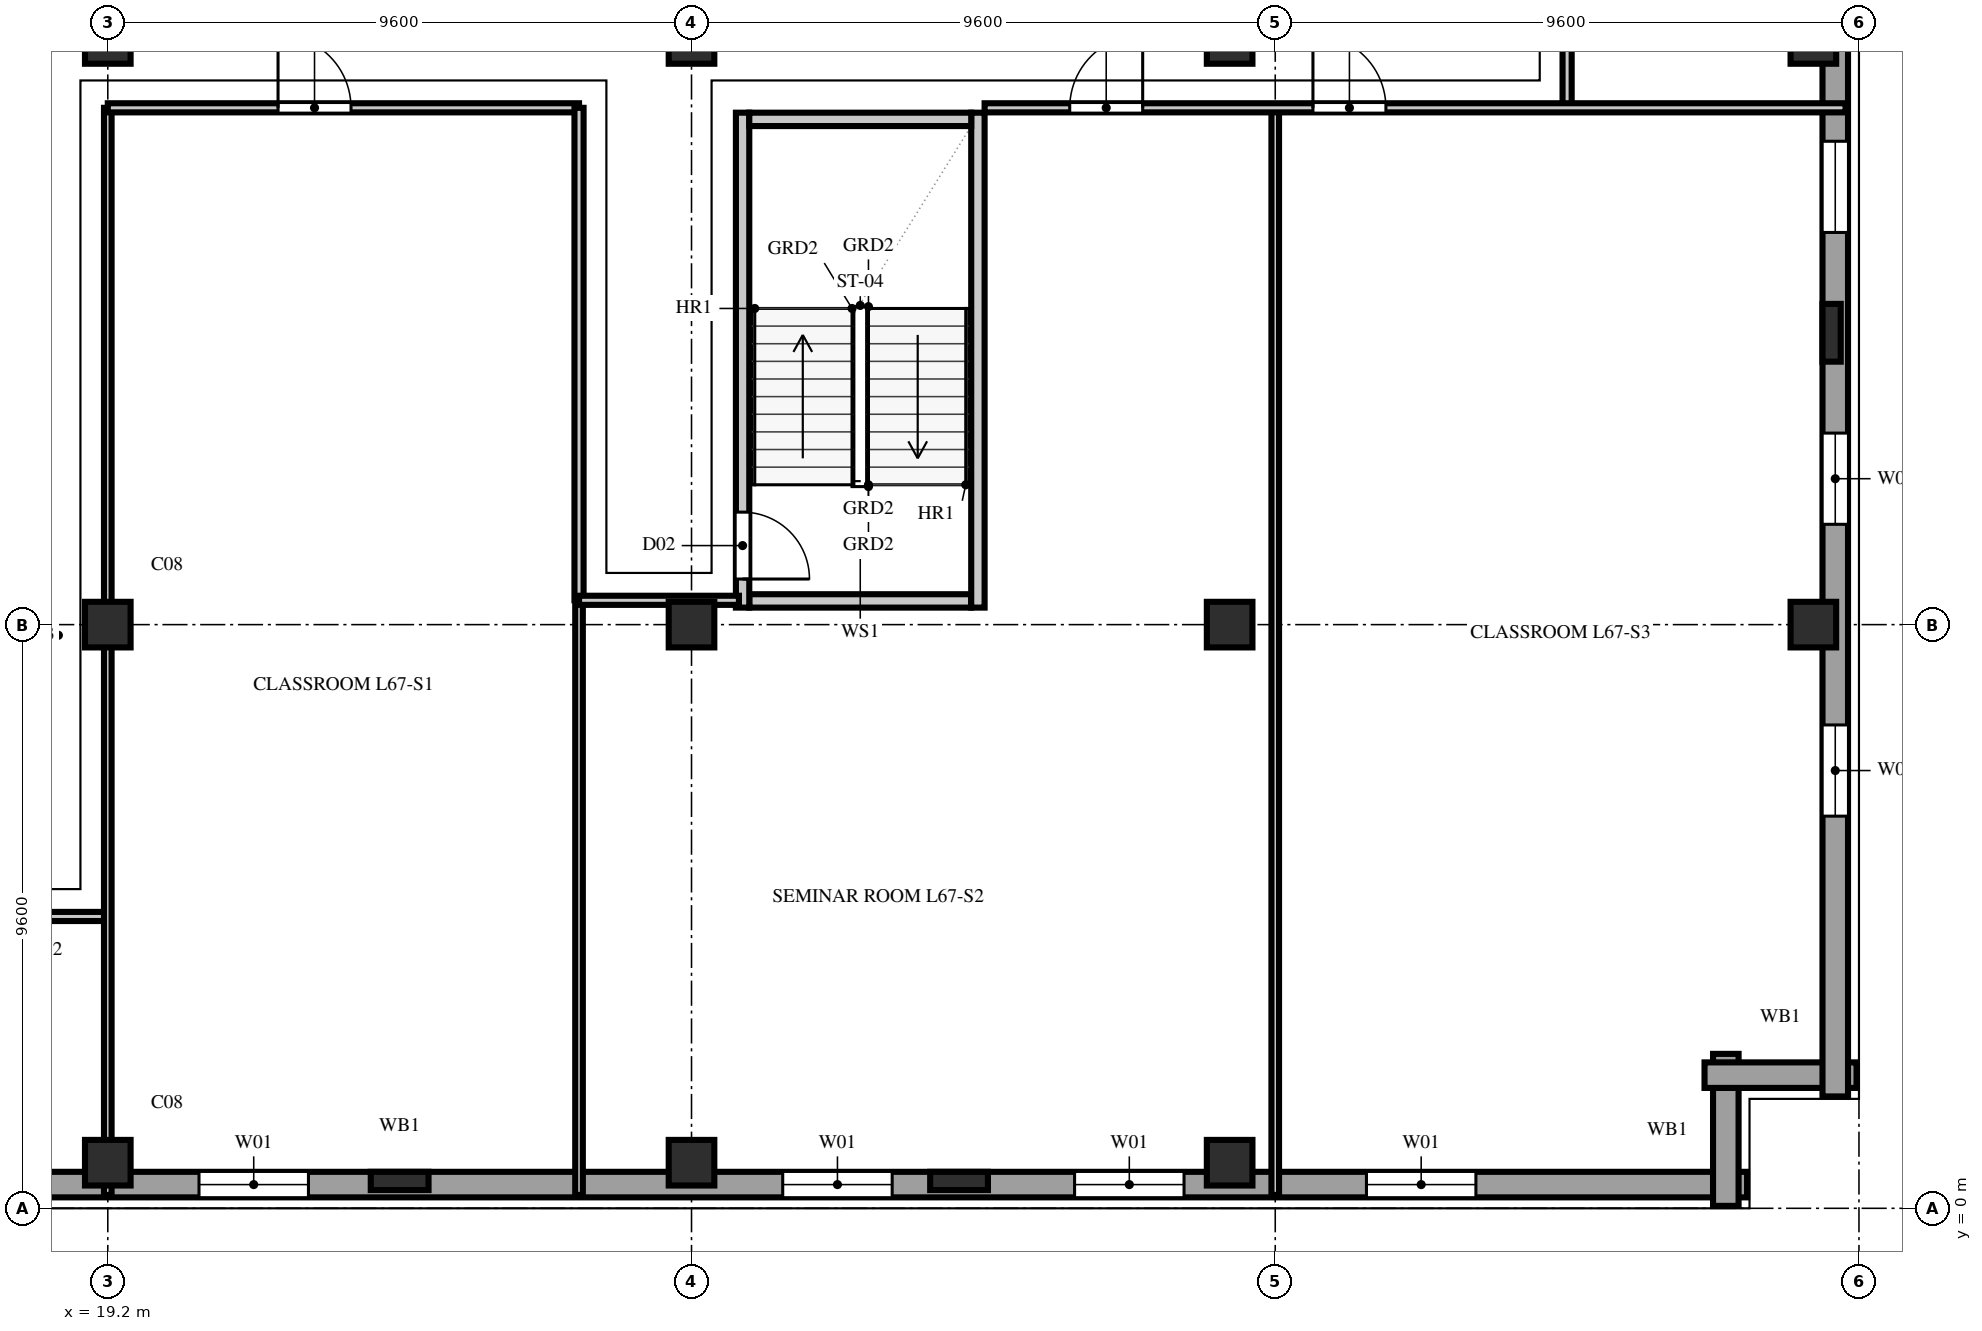
"""IFC4 building model, lengths in metres.
Left out: names, types, materials, properties, quantities, classifications, styles, units other than length and angle.
Written with IfcOpenShell. Run it as: python <this file> out.ifc"""

import sys

from ifc_helpers import new_model, si_unit, direction, frame, frame_2d, origin, origin_2d, place, context, subcontext, project, spatial, rectangle, extrude, element, fill, save


model = new_model("IFC4")
c1 = context("Model", 3, precision=1e-05, world=origin(), true_north=direction((0.0, 1.0)))
c2 = subcontext(c1, "Body", "Model", "MODEL_VIEW")
j1 = project(units=[si_unit("LENGTHUNIT", "METRE"), si_unit("PLANEANGLEUNIT", "RADIAN")], contexts=[c1])
p1 = place(None, origin())
s1 = spatial("IfcSite", under=j1, at=p1, CompositionType="ELEMENT")
p2 = place(p1, origin())
s2 = spatial("IfcBuilding", under=s1, at=p2, CompositionType="ELEMENT")
p3 = place(p2, frame((0.0, 0.0, 265.8)))
s3 = spatial("IfcBuildingStorey", under=s2, at=p3, CompositionType="ELEMENT", Elevation=265.8)
for number, where, z_axis, x_axis in (
    (1, (19.2, 0.75, 0.0), (0.0, 0.0, 1.0), (1.0, 0.0, 0.0)),
    (2, (19.2, 9.6, 0.0), (0.0, 0.0, 1.0), (1.0, 0.0, 0.0)),
    (3, (19.2, 19.2, 0.0), (0.0, 0.0, 1.0), (1.0, 0.0, 0.0)),
    (4, (28.8, 0.75, 0.0), (0.0, 0.0, 1.0), (1.0, 0.0, 0.0)),
    (5, (28.8, 9.6, 0.0), (0.0, 0.0, 1.0), (1.0, 0.0, 0.0)),
    (6, (28.8, 19.2, 0.0), (0.0, 0.0, 1.0), (1.0, 0.0, 0.0)),
    (7, (37.65, 0.75, 0.0), (0.0, 0.0, 1.0), (1.0, 0.0, 0.0)),
    (8, (37.65, 9.6, 0.0), (0.0, 0.0, 1.0), (1.0, 0.0, 0.0)),
    (9, (37.65, 19.2, 0.0), (0.0, 0.0, 1.0), (1.0, 0.0, 0.0)),
    (10, (47.25, 9.6, 0.0), (0.0, 0.0, 1.0), (1.0, 0.0, 0.0)),
    (11, (47.25, 19.2, 0.0), (0.0, 0.0, 1.0), (1.0, 0.0, 0.0)),
):
    element("IfcColumn", number, at=place(p3, frame(where, z_axis=z_axis, x_axis=x_axis)), inside=s3, PredefinedType="COLUMN", context=c2, shape_type="SweptSolid", body=[
        extrude(rectangle(XDim=0.75, YDim=0.75, at=origin_2d()), origin(), (0.0, 0.0, 1.0), 3.8),
    ])
for number, where, z_axis, x_axis in (
    (12, (24.0, 0.45, 0.0), (0.0, 0.0, 1.0), (1.0, 0.0, 0.0)),
    (13, (33.2, 0.45, 0.0), (0.0, 0.0, 1.0), (1.0, 0.0, 0.0)),
    (14, (47.55, 14.4, 0.0), (0.0, 0.0, 1.0), (0.0, 1.0, 0.0)),
):
    element("IfcColumn", number, at=place(p3, frame(where, z_axis=z_axis, x_axis=x_axis)), inside=s3, PredefinedType="PILASTER", context=c2, shape_type="SweptSolid", body=[
        extrude(rectangle(XDim=0.95, YDim=0.3, at=origin_2d()), origin(), (0.0, 0.0, 1.0), 3.8),
    ])
p4 = place(p3, frame((1.84, 0.39, 0.0), z_axis=(0.0, 0.0, 1.0), x_axis=(1.0, 0.0, 0.0)))
e15 = element("IfcWall", 15, at=p4, inside=s3, PredefinedType="SOLIDWALL", context=c2, shape_type="SweptSolid", body=[
    extrude(rectangle(XDim=44.32, YDim=0.42, at=frame_2d((22.16, 0.0))), origin(), (0.0, 0.0, 1.0), 3.54),
])
p5 = place(p4, frame((4.46, 0.0, 0.85)))
e16 = element("IfcOpeningElement", 16, at=p5, cuts=e15, PredefinedType="OPENING", context=c2, shape_type="SweptSolid", body=[
    extrude(rectangle(XDim=1.8, YDim=1.85, at=frame_2d((0.9, 0.925))), frame((0.0, 0.222, 0.0), z_axis=(0.0, -1.0, 0.0), x_axis=(1.0, 0.0, 0.0)), (0.0, 0.0, 1.0), 0.444),
])
p6 = place(p4, frame((9.26, 0.0, 0.85)))
e17 = element("IfcOpeningElement", 17, at=p6, cuts=e15, PredefinedType="OPENING", context=c2, shape_type="SweptSolid", body=[
    extrude(rectangle(XDim=1.8, YDim=1.85, at=frame_2d((0.9, 0.925))), frame((0.0, 0.222, 0.0), z_axis=(0.0, -1.0, 0.0), x_axis=(1.0, 0.0, 0.0)), (0.0, 0.0, 1.0), 0.444),
])
p7 = place(p4, frame((18.86, 0.0, 0.85)))
e18 = element("IfcOpeningElement", 18, at=p7, cuts=e15, PredefinedType="OPENING", context=c2, shape_type="SweptSolid", body=[
    extrude(rectangle(XDim=1.8, YDim=1.85, at=frame_2d((0.9, 0.925))), frame((0.0, 0.222, 0.0), z_axis=(0.0, -1.0, 0.0), x_axis=(1.0, 0.0, 0.0)), (0.0, 0.0, 1.0), 0.444),
])
p8 = place(p4, frame((28.46, 0.0, 0.85)))
e19 = element("IfcOpeningElement", 19, at=p8, cuts=e15, PredefinedType="OPENING", context=c2, shape_type="SweptSolid", body=[
    extrude(rectangle(XDim=1.8, YDim=1.85, at=frame_2d((0.9, 0.925))), frame((0.0, 0.222, 0.0), z_axis=(0.0, -1.0, 0.0), x_axis=(1.0, 0.0, 0.0)), (0.0, 0.0, 1.0), 0.444),
])
p9 = place(p4, frame((33.26, 0.0, 0.85)))
e20 = element("IfcOpeningElement", 20, at=p9, cuts=e15, PredefinedType="OPENING", context=c2, shape_type="SweptSolid", body=[
    extrude(rectangle(XDim=1.8, YDim=1.85, at=frame_2d((0.9, 0.925))), frame((0.0, 0.222, 0.0), z_axis=(0.0, -1.0, 0.0), x_axis=(1.0, 0.0, 0.0)), (0.0, 0.0, 1.0), 0.444),
])
p10 = place(p4, frame((38.06, 0.0, 0.85)))
e21 = element("IfcOpeningElement", 21, at=p10, cuts=e15, PredefinedType="OPENING", context=c2, shape_type="SweptSolid", body=[
    extrude(rectangle(XDim=1.8, YDim=1.85, at=frame_2d((0.9, 0.925))), frame((0.0, 0.222, 0.0), z_axis=(0.0, -1.0, 0.0), x_axis=(1.0, 0.0, 0.0)), (0.0, 0.0, 1.0), 0.444),
])
for number, where, z_axis, x_axis in (
    (22, (45.81, 0.04, 0.0), (0.0, 0.0, 1.0), (0.0, 1.0, 0.0)),
    (23, (45.46, 2.19, 0.0), (0.0, 0.0, 1.0), (1.0, 0.0, 0.0)),
):
    element("IfcWall", number, at=place(p3, frame(where, z_axis=z_axis, x_axis=x_axis)), inside=s3, PredefinedType="SOLIDWALL", context=c2, shape_type="SweptSolid", body=[
        extrude(rectangle(XDim=2.5, YDim=0.42, at=frame_2d((1.25, 0.0))), origin(), (0.0, 0.0, 1.0), 3.54),
    ])
p11 = place(p3, frame((47.61, 1.84, 0.0), z_axis=(0.0, 0.0, 1.0), x_axis=(0.0, 1.0, 0.0)))
e24 = element("IfcWall", 24, at=p11, inside=s3, PredefinedType="SOLIDWALL", context=c2, shape_type="SweptSolid", body=[
    extrude(rectangle(XDim=34.72, YDim=0.42, at=frame_2d((17.36, 0.0))), origin(), (0.0, 0.0, 1.0), 3.54),
])
p12 = place(p11, frame((4.61, 0.0, 0.85)))
e25 = element("IfcOpeningElement", 25, at=p12, cuts=e24, PredefinedType="OPENING", context=c2, shape_type="SweptSolid", body=[
    extrude(rectangle(XDim=1.5, YDim=1.85, at=frame_2d((0.75, 0.925))), frame((0.0, 0.222, 0.0), z_axis=(0.0, -1.0, 0.0), x_axis=(1.0, 0.0, 0.0)), (0.0, 0.0, 1.0), 0.444),
])
p13 = place(p11, frame((9.41, 0.0, 0.85)))
e26 = element("IfcOpeningElement", 26, at=p13, cuts=e24, PredefinedType="OPENING", context=c2, shape_type="SweptSolid", body=[
    extrude(rectangle(XDim=1.5, YDim=1.85, at=frame_2d((0.75, 0.925))), frame((0.0, 0.222, 0.0), z_axis=(0.0, -1.0, 0.0), x_axis=(1.0, 0.0, 0.0)), (0.0, 0.0, 1.0), 0.444),
])
p14 = place(p11, frame((14.21, 0.0, 0.85)))
e27 = element("IfcOpeningElement", 27, at=p14, cuts=e24, PredefinedType="OPENING", context=c2, shape_type="SweptSolid", body=[
    extrude(rectangle(XDim=1.5, YDim=1.85, at=frame_2d((0.75, 0.925))), frame((0.0, 0.222, 0.0), z_axis=(0.0, -1.0, 0.0), x_axis=(1.0, 0.0, 0.0)), (0.0, 0.0, 1.0), 0.444),
])
p15 = place(p11, frame((23.81, 0.0, 0.85)))
e28 = element("IfcOpeningElement", 28, at=p15, cuts=e24, PredefinedType="OPENING", context=c2, shape_type="SweptSolid", body=[
    extrude(rectangle(XDim=1.5, YDim=1.85, at=frame_2d((0.75, 0.925))), frame((0.0, 0.222, 0.0), z_axis=(0.0, -1.0, 0.0), x_axis=(1.0, 0.0, 0.0)), (0.0, 0.0, 1.0), 0.444),
])
p16 = place(p11, frame((28.61, 0.0, 0.85)))
e29 = element("IfcOpeningElement", 29, at=p16, cuts=e24, PredefinedType="OPENING", context=c2, shape_type="SweptSolid", body=[
    extrude(rectangle(XDim=1.5, YDim=1.85, at=frame_2d((0.75, 0.925))), frame((0.0, 0.222, 0.0), z_axis=(0.0, -1.0, 0.0), x_axis=(1.0, 0.0, 0.0)), (0.0, 0.0, 1.0), 0.444),
])
p17 = place(p3, frame((29.75, 9.99, 0.0), z_axis=(0.0, 0.0, 1.0), x_axis=(1.0, 0.0, 0.0)))
e30 = element("IfcWall", 30, at=p17, inside=s3, PredefinedType="SOLIDWALL", context=c2, shape_type="SweptSolid", body=[
    extrude(rectangle(XDim=3.65, YDim=0.22, at=frame_2d((1.825, 0.0))), origin(), (0.0, 0.0, 1.0), 3.54),
])
p18 = place(p3, frame((29.64, 9.88, 0.0), z_axis=(0.0, 0.0, 1.0), x_axis=(0.0, 1.0, 0.0)))
e31 = element("IfcWall", 31, at=p18, inside=s3, PredefinedType="SOLIDWALL", context=c2, shape_type="SweptSolid", body=[
    extrude(rectangle(XDim=8.14, YDim=0.22, at=frame_2d((4.07, 0.0))), origin(), (0.0, 0.0, 1.0), 3.54),
])
p19 = place(p18, frame((0.47, 0.0, 0.0)))
e32 = element("IfcOpeningElement", 32, at=p19, cuts=e31, PredefinedType="OPENING", context=c2, shape_type="SweptSolid", body=[
    extrude(rectangle(XDim=1.1, YDim=2.2, at=frame_2d((0.55, 1.1))), frame((0.0, 0.122, 0.0), z_axis=(0.0, -1.0, 0.0), x_axis=(1.0, 0.0, 0.0)), (0.0, 0.0, 1.0), 0.244),
])
p20 = place(p3, frame((33.51, 9.88, 0.0), z_axis=(0.0, 0.0, 1.0), x_axis=(0.0, 1.0, 0.0)))
e33 = element("IfcWall", 33, at=p20, inside=s3, PredefinedType="SOLIDWALL", context=c2, shape_type="SweptSolid", body=[
    extrude(rectangle(XDim=8.14, YDim=0.22, at=frame_2d((4.07, 0.0))), origin(), (0.0, 0.0, 1.0), 3.54),
])
p21 = place(p3, frame((29.75, 17.91, 0.0), z_axis=(0.0, 0.0, 1.0), x_axis=(1.0, 0.0, 0.0)))
e34 = element("IfcWall", 34, at=p21, inside=s3, PredefinedType="SOLIDWALL", context=c2, shape_type="SweptSolid", body=[
    extrude(rectangle(XDim=3.65, YDim=0.22, at=frame_2d((1.825, 0.0))), origin(), (0.0, 0.0, 1.0), 3.54),
])
p22 = place(p3, frame((17.05, 4.8, 0.0), z_axis=(0.0, 0.0, 1.0), x_axis=(1.0, 0.0, 0.0)))
e35 = element("IfcWall", 35, at=p22, inside=s3, PredefinedType="PARTITIONING", context=c2, shape_type="SweptSolid", body=[
    extrude(rectangle(XDim=2.15, YDim=0.15, at=frame_2d((1.075, 0.0))), origin(), (0.0, 0.0, 1.0), 3.54),
])
p23 = place(p3, frame((43.2, 18.1, 0.0), z_axis=(0.0, 0.0, 1.0), x_axis=(0.0, 1.0, 0.0)))
e36 = element("IfcWall", 36, at=p23, inside=s3, PredefinedType="PARTITIONING", context=c2, shape_type="SweptSolid", body=[
    extrude(rectangle(XDim=2.85, YDim=0.15, at=frame_2d((1.425, 0.0))), origin(), (0.0, 0.0, 1.0), 3.54),
])
p24 = place(p3, frame((19.2, 0.22, 0.0), z_axis=(0.0, 0.0, 1.0), x_axis=(0.0, 1.0, 0.0)))
e37 = element("IfcWall", 37, at=p24, inside=s3, PredefinedType="PARTITIONING", context=c2, shape_type="SweptSolid", body=[
    extrude(rectangle(XDim=0.53, YDim=0.125, at=frame_2d((0.265, 0.0))), origin(), (0.0, 0.0, 1.0), 3.54),
])
p25 = place(p3, frame((19.2, 0.75, 0.0), z_axis=(0.0, 0.0, 1.0), x_axis=(0.0, 1.0, 0.0)))
e38 = element("IfcWall", 38, at=p25, inside=s3, PredefinedType="PARTITIONING", context=c2, shape_type="SweptSolid", body=[
    extrude(rectangle(XDim=17.35, YDim=0.125, at=frame_2d((8.675, 0.0))), origin(), (0.0, 0.0, 1.0), 3.123),
])
p26 = place(p3, frame((19.2, 18.1, 0.0), z_axis=(0.0, 0.0, 1.0), x_axis=(1.0, 0.0, 0.0)))
e39 = element("IfcWall", 39, at=p26, inside=s3, PredefinedType="PARTITIONING", context=c2, shape_type="SweptSolid", body=[
    extrude(rectangle(XDim=7.75, YDim=0.15, at=frame_2d((3.875, 0.0))), origin(), (0.0, 0.0, 1.0), 3.54),
])
p27 = place(p26, frame((2.8, 0.0, 0.0)))
e40 = element("IfcOpeningElement", 40, at=p27, cuts=e39, PredefinedType="OPENING", context=c2, shape_type="SweptSolid", body=[
    extrude(rectangle(XDim=1.2, YDim=2.2, at=frame_2d((0.6, 1.1))), frame((0.0, 0.087, 0.0), z_axis=(0.0, -1.0, 0.0), x_axis=(1.0, 0.0, 0.0)), (0.0, 0.0, 1.0), 0.174),
])
p28 = place(p3, frame((26.95, 0.22, 0.0), z_axis=(0.0, 0.0, 1.0), x_axis=(0.0, 1.0, 0.0)))
e41 = element("IfcWall", 41, at=p28, inside=s3, PredefinedType="PARTITIONING", context=c2, shape_type="SweptSolid", body=[
    extrude(rectangle(XDim=9.78, YDim=0.125, at=frame_2d((4.89, 0.0))), origin(), (0.0, 0.0, 1.0), 3.54),
])
p29 = place(p3, frame((26.95, 10.0, 0.0), z_axis=(0.0, 0.0, 1.0), x_axis=(0.0, 1.0, 0.0)))
e42 = element("IfcWall", 42, at=p29, inside=s3, PredefinedType="PARTITIONING", context=c2, shape_type="SweptSolid", body=[
    extrude(rectangle(XDim=8.1, YDim=0.15, at=frame_2d((4.05, 0.0))), origin(), (0.0, 0.0, 1.0), 3.54),
])
p30 = place(p3, frame((26.95, 10.0, 0.0), z_axis=(0.0, 0.0, 1.0), x_axis=(1.0, 0.0, 0.0)))
e43 = element("IfcWall", 43, at=p30, inside=s3, PredefinedType="PARTITIONING", context=c2, shape_type="SweptSolid", body=[
    extrude(rectangle(XDim=2.63, YDim=0.15, at=frame_2d((1.315, 0.0))), origin(), (0.0, 0.0, 1.0), 3.54),
])
p31 = place(p3, frame((38.4, 0.22, 0.0), z_axis=(0.0, 0.0, 1.0), x_axis=(0.0, 1.0, 0.0)))
e44 = element("IfcWall", 44, at=p31, inside=s3, PredefinedType="PARTITIONING", context=c2, shape_type="SweptSolid", body=[
    extrude(rectangle(XDim=17.88, YDim=0.125, at=frame_2d((8.94, 0.0))), origin(), (0.0, 0.0, 1.0), 3.54),
])
p32 = place(p3, frame((33.62, 18.1, 0.0), z_axis=(0.0, 0.0, 1.0), x_axis=(1.0, 0.0, 0.0)))
e45 = element("IfcWall", 45, at=p32, inside=s3, PredefinedType="PARTITIONING", context=c2, shape_type="SweptSolid", body=[
    extrude(rectangle(XDim=14.16, YDim=0.15, at=frame_2d((7.08, 0.0))), origin(), (0.0, 0.0, 1.0), 3.54),
])
p33 = place(p32, frame((1.4, 0.0, 0.0)))
e46 = element("IfcOpeningElement", 46, at=p33, cuts=e45, PredefinedType="OPENING", context=c2, shape_type="SweptSolid", body=[
    extrude(rectangle(XDim=1.2, YDim=2.2, at=frame_2d((0.6, 1.1))), frame((0.0, 0.087, 0.0), z_axis=(0.0, -1.0, 0.0), x_axis=(1.0, 0.0, 0.0)), (0.0, 0.0, 1.0), 0.174),
])
p34 = place(p32, frame((5.4, 0.0, 0.0)))
e47 = element("IfcOpeningElement", 47, at=p34, cuts=e45, PredefinedType="OPENING", context=c2, shape_type="SweptSolid", body=[
    extrude(rectangle(XDim=1.2, YDim=2.2, at=frame_2d((0.6, 1.1))), frame((0.0, 0.087, 0.0), z_axis=(0.0, -1.0, 0.0), x_axis=(1.0, 0.0, 0.0)), (0.0, 0.0, 1.0), 0.174),
])
p35 = place(p7, origin())
e48 = element("IfcWindow", 48, at=p35, inside=s3, PartitioningType="DOUBLE_PANEL_VERTICAL", PredefinedType="WINDOW", context=c2, shape_type="SweptSolid", body=[
    extrude(rectangle(XDim=1.8, YDim=1.85, at=frame_2d((0.9, 0.925))), frame((0.0, 0.11, 0.0), z_axis=(0.0, -1.0, 0.0), x_axis=(1.0, 0.0, 0.0)), (0.0, 0.0, 1.0), 0.06),
])
fill(e18, e48)
p36 = place(p8, origin())
e49 = element("IfcWindow", 49, at=p36, inside=s3, PartitioningType="DOUBLE_PANEL_VERTICAL", PredefinedType="WINDOW", context=c2, shape_type="SweptSolid", body=[
    extrude(rectangle(XDim=1.8, YDim=1.85, at=frame_2d((0.9, 0.925))), frame((0.0, 0.11, 0.0), z_axis=(0.0, -1.0, 0.0), x_axis=(1.0, 0.0, 0.0)), (0.0, 0.0, 1.0), 0.06),
])
fill(e19, e49)
p37 = place(p9, origin())
e50 = element("IfcWindow", 50, at=p37, inside=s3, PartitioningType="DOUBLE_PANEL_VERTICAL", PredefinedType="WINDOW", context=c2, shape_type="SweptSolid", body=[
    extrude(rectangle(XDim=1.8, YDim=1.85, at=frame_2d((0.9, 0.925))), frame((0.0, 0.11, 0.0), z_axis=(0.0, -1.0, 0.0), x_axis=(1.0, 0.0, 0.0)), (0.0, 0.0, 1.0), 0.06),
])
fill(e20, e50)
p38 = place(p10, origin())
e51 = element("IfcWindow", 51, at=p38, inside=s3, PartitioningType="DOUBLE_PANEL_VERTICAL", PredefinedType="WINDOW", context=c2, shape_type="SweptSolid", body=[
    extrude(rectangle(XDim=1.8, YDim=1.85, at=frame_2d((0.9, 0.925))), frame((0.0, 0.11, 0.0), z_axis=(0.0, -1.0, 0.0), x_axis=(1.0, 0.0, 0.0)), (0.0, 0.0, 1.0), 0.06),
])
fill(e21, e51)
p39 = place(p12, origin())
e52 = element("IfcWindow", 52, at=p39, inside=s3, PartitioningType="DOUBLE_PANEL_VERTICAL", PredefinedType="WINDOW", context=c2, shape_type="SweptSolid", body=[
    extrude(rectangle(XDim=1.5, YDim=1.85, at=frame_2d((0.75, 0.925))), frame((0.0, 0.11, 0.0), z_axis=(0.0, -1.0, 0.0), x_axis=(1.0, 0.0, 0.0)), (0.0, 0.0, 1.0), 0.06),
])
fill(e25, e52)
p40 = place(p13, origin())
e53 = element("IfcWindow", 53, at=p40, inside=s3, PartitioningType="DOUBLE_PANEL_VERTICAL", PredefinedType="WINDOW", context=c2, shape_type="SweptSolid", body=[
    extrude(rectangle(XDim=1.5, YDim=1.85, at=frame_2d((0.75, 0.925))), frame((0.0, 0.11, 0.0), z_axis=(0.0, -1.0, 0.0), x_axis=(1.0, 0.0, 0.0)), (0.0, 0.0, 1.0), 0.06),
])
fill(e26, e53)
p41 = place(p14, origin())
e54 = element("IfcWindow", 54, at=p41, inside=s3, PartitioningType="DOUBLE_PANEL_VERTICAL", PredefinedType="WINDOW", context=c2, shape_type="SweptSolid", body=[
    extrude(rectangle(XDim=1.5, YDim=1.85, at=frame_2d((0.75, 0.925))), frame((0.0, 0.11, 0.0), z_axis=(0.0, -1.0, 0.0), x_axis=(1.0, 0.0, 0.0)), (0.0, 0.0, 1.0), 0.06),
])
fill(e27, e54)
p42 = place(p19, frame((1.1, 0.0, 0.0), z_axis=(0.0, 0.0, 1.0), x_axis=(-1.0, 0.0, 0.0)))
e55 = element("IfcDoor", 55, at=p42, inside=s3, OperationType="SINGLE_SWING_RIGHT", PredefinedType="DOOR", context=c2, shape_type="SweptSolid", body=[
    extrude(rectangle(XDim=1.1, YDim=2.2, at=frame_2d((0.55, 1.1))), frame((0.0, 0.025, 0.0), z_axis=(0.0, -1.0, 0.0), x_axis=(1.0, 0.0, 0.0)), (0.0, 0.0, 1.0), 0.05),
])
fill(e32, e55)
p43 = place(p27, origin())
e56 = element("IfcDoor", 56, at=p43, inside=s3, OperationType="SINGLE_SWING_LEFT", PredefinedType="DOOR", context=c2, shape_type="SweptSolid", body=[
    extrude(rectangle(XDim=1.2, YDim=2.2, at=frame_2d((0.6, 1.1))), frame((0.0, 0.025, 0.0), z_axis=(0.0, -1.0, 0.0), x_axis=(1.0, 0.0, 0.0)), (0.0, 0.0, 1.0), 0.05),
])
fill(e40, e56)
p44 = place(p33, origin())
e57 = element("IfcDoor", 57, at=p44, inside=s3, OperationType="SINGLE_SWING_RIGHT", PredefinedType="DOOR", context=c2, shape_type="SweptSolid", body=[
    extrude(rectangle(XDim=1.2, YDim=2.2, at=frame_2d((0.6, 1.1))), frame((0.0, 0.025, 0.0), z_axis=(0.0, -1.0, 0.0), x_axis=(1.0, 0.0, 0.0)), (0.0, 0.0, 1.0), 0.05),
])
fill(e46, e57)
p45 = place(p34, origin())
e58 = element("IfcDoor", 58, at=p45, inside=s3, OperationType="SINGLE_SWING_LEFT", PredefinedType="DOOR", context=c2, shape_type="SweptSolid", body=[
    extrude(rectangle(XDim=1.2, YDim=2.2, at=frame_2d((0.6, 1.1))), frame((0.0, 0.025, 0.0), z_axis=(0.0, -1.0, 0.0), x_axis=(1.0, 0.0, 0.0)), (0.0, 0.0, 1.0), 0.05),
])
fill(e47, e58)
save(model, sys.argv[1])
